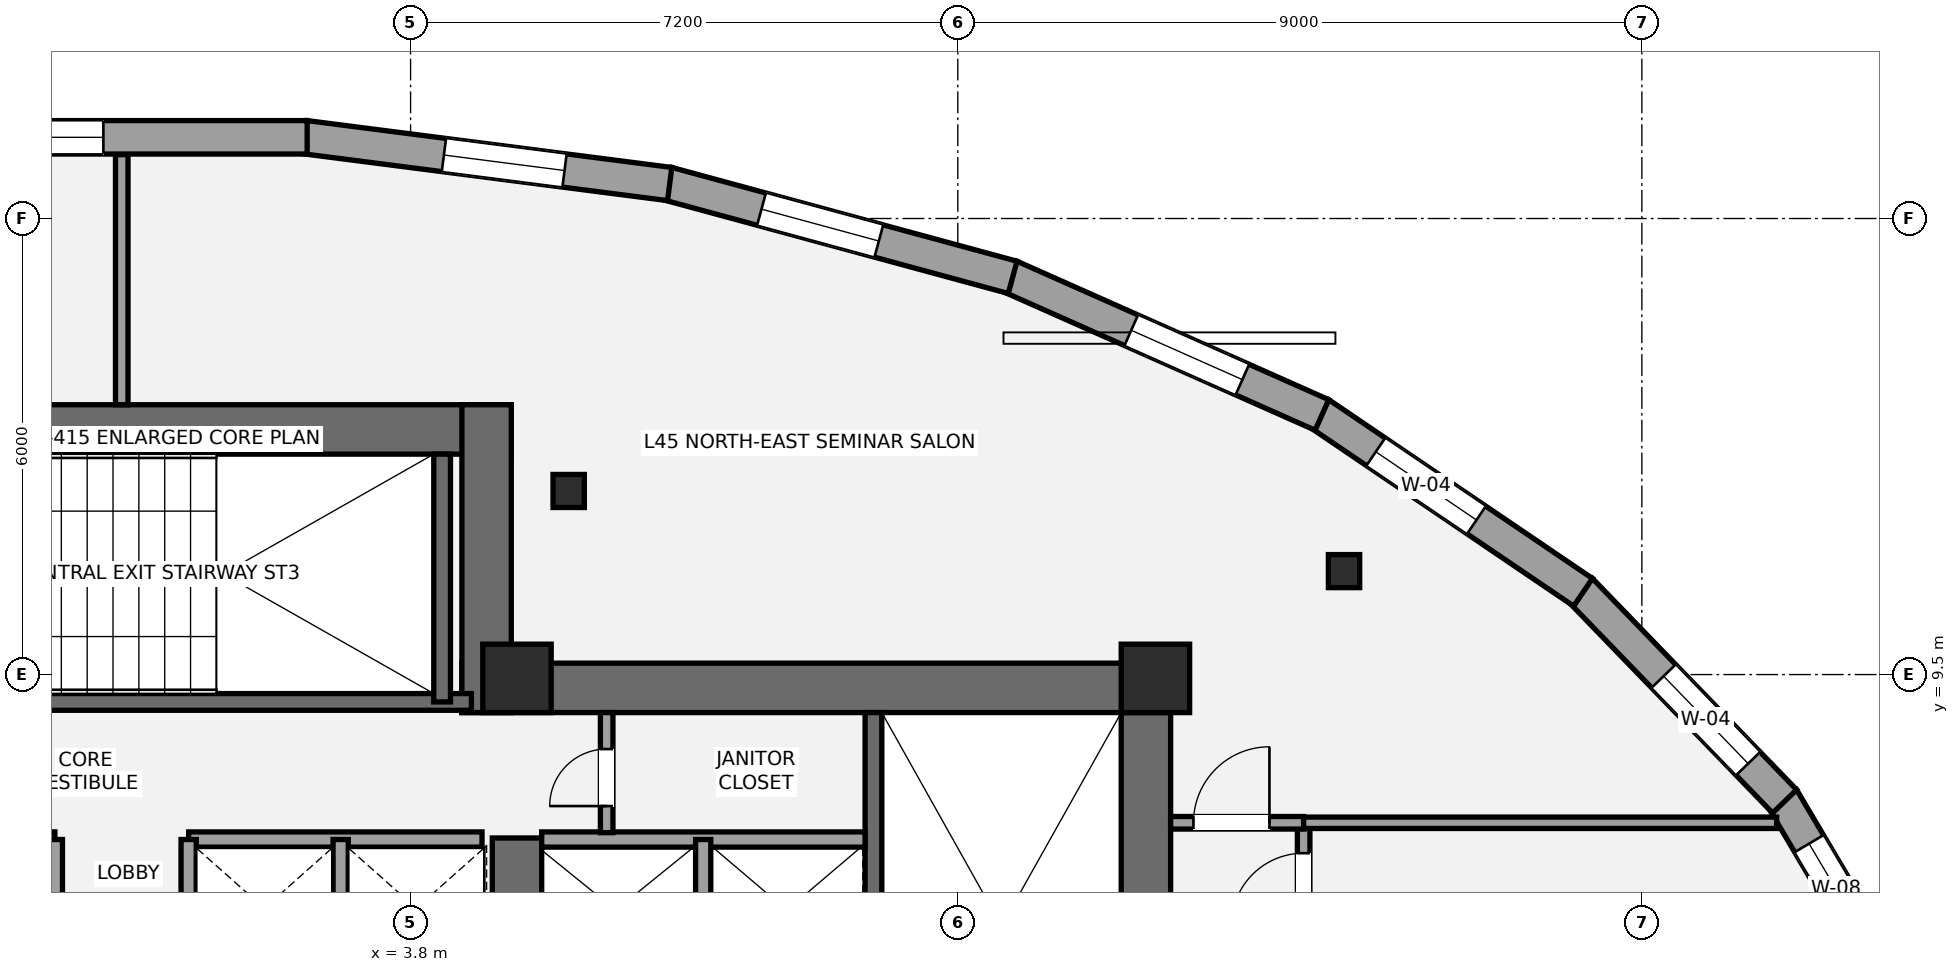
"""IFC4 building model, lengths in metres.
Left out: names, types, materials, properties, quantities, classifications, styles, units other than length and angle.
Written with IfcOpenShell. Run it as: python <this file> out.ifc"""

import sys

from ifc_helpers import new_model, si_unit, direction, frame, frame_2d, origin, origin_2d, place, context, subcontext, project, spatial, rectangle, i_section, extrude, element, fill, save


model = new_model("IFC4")
c1 = context("Model", 3, precision=1e-05, world=origin(), true_north=direction((0.0, 1.0)))
c2 = subcontext(c1, "Body", "Model", "MODEL_VIEW")
j1 = project(units=[si_unit("LENGTHUNIT", "METRE"), si_unit("PLANEANGLEUNIT", "RADIAN")], contexts=[c1])
p1 = place(None, origin())
s1 = spatial("IfcSite", under=j1, at=p1, CompositionType="ELEMENT")
p2 = place(p1, origin())
s2 = spatial("IfcBuilding", under=s1, at=p2, CompositionType="ELEMENT")
p3 = place(p2, frame((0.0, 0.0, 166.2)))
s3 = spatial("IfcBuildingStorey", under=s2, at=p3, CompositionType="ELEMENT", Elevation=166.2)
p4 = place(p3, frame((13.475, 1.2, 0.0), z_axis=(0.0, 0.0, 1.0), x_axis=(0.0, 1.0, 0.0)))
e1 = element("IfcWall", 1, at=p4, inside=s3, PredefinedType="SHEAR", context=c2, shape_type="SweptSolid", body=[
    extrude(rectangle(XDim=8.45, YDim=0.65, at=frame_2d((4.225, 0.0))), origin(), (0.0, 0.0, 1.0), 3.2),
])
p5 = place(p3, frame((4.475, 9.325, 0.0), z_axis=(0.0, 0.0, 1.0), x_axis=(1.0, 0.0, 0.0)))
e2 = element("IfcWall", 2, at=p5, inside=s3, PredefinedType="SHEAR", context=c2, shape_type="SweptSolid", body=[
    extrude(rectangle(XDim=9.325, YDim=0.65, at=frame_2d((4.663, 0.0))), origin(), (0.0, 0.0, 1.0), 3.2),
])
p6 = place(p3, frame((5.2, 5.35, 0.0), z_axis=(0.0, 0.0, 1.0), x_axis=(0.0, 1.0, 0.0)))
e3 = element("IfcWall", 3, at=p6, inside=s3, PredefinedType="SHEAR", context=c2, shape_type="SweptSolid", body=[
    extrude(rectangle(XDim=2.0, YDim=0.65, at=frame_2d((1.0, 0.0))), origin(), (0.0, 0.0, 1.0), 3.2),
])
p7 = place(p3, frame((9.89, 1.85, 0.0), z_axis=(0.0, 0.0, 1.0), x_axis=(0.0, 1.0, 0.0)))
e4 = element("IfcWall", 4, at=p7, inside=s3, PredefinedType="SHEAR", context=c2, shape_type="SweptSolid", body=[
    extrude(rectangle(XDim=7.15, YDim=0.22, at=frame_2d((3.575, 0.0))), origin(), (0.0, 0.0, 1.0), 3.2),
])
p8 = place(p3, frame((-5.125, 12.725, 0.0), z_axis=(0.0, 0.0, 1.0), x_axis=(1.0, 0.0, 0.0)))
e5 = element("IfcWall", 5, at=p8, inside=s3, PredefinedType="SHEAR", context=c2, shape_type="SweptSolid", body=[
    extrude(rectangle(XDim=10.25, YDim=0.65, at=frame_2d((5.125, 0.0))), origin(), (0.0, 0.0, 1.0), 3.2),
])
p9 = place(p3, frame((4.8, 9.0, 0.0), z_axis=(0.0, 0.0, 1.0), x_axis=(0.0, 1.0, 0.0)))
e6 = element("IfcWall", 6, at=p9, inside=s3, PredefinedType="SHEAR", context=c2, shape_type="SweptSolid", body=[
    extrude(rectangle(XDim=4.05, YDim=0.65, at=frame_2d((2.025, 0.0))), origin(), (0.0, 0.0, 1.0), 3.2),
])
p10 = place(p3, frame((-4.7, 9.14, 0.0), z_axis=(0.0, 0.0, 1.0), x_axis=(1.0, 0.0, 0.0)))
e7 = element("IfcWall", 7, at=p10, inside=s3, PredefinedType="SHEAR", context=c2, shape_type="SweptSolid", body=[
    extrude(rectangle(XDim=9.3, YDim=0.22, at=frame_2d((4.65, 0.0))), origin(), (0.0, 0.0, 1.0), 3.2),
])
p11 = place(p10, frame((1.15, 0.0, 0.0)))
e8 = element("IfcOpeningElement", 8, at=p11, cuts=e7, PredefinedType="OPENING", context=c2, shape_type="SweptSolid", body=[
    extrude(rectangle(XDim=1.05, YDim=2.15, at=frame_2d((0.525, 1.075))), frame((0.0, 0.12, 0.0), z_axis=(0.0, -1.0, 0.0), x_axis=(1.0, 0.0, 0.0)), (0.0, 0.0, 1.0), 0.24),
])
p12 = place(p3, frame((4.215, 9.14, 0.0), z_axis=(0.0, 0.0, 1.0), x_axis=(0.0, 1.0, 0.0)))
e9 = element("IfcWall", 9, at=p12, inside=s3, PredefinedType="SHEAR", context=c2, shape_type="SweptSolid", body=[
    extrude(rectangle(XDim=3.26, YDim=0.22, at=frame_2d((1.63, 0.0))), origin(), (0.0, 0.0, 1.0), 3.2),
])
for number, where, z_axis, x_axis in (
    (10, (5.2, 9.45, 0.0), (0.0, 0.0, 1.0), (1.0, 0.0, 0.0)),
    (11, (13.6, 9.45, 0.0), (0.0, 0.0, 1.0), (1.0, 0.0, 0.0)),
):
    element("IfcColumn", number, at=place(p3, frame(where, z_axis=z_axis, x_axis=x_axis)), inside=s3, PredefinedType="COLUMN", context=c2, shape_type="SweptSolid", body=[
        extrude(rectangle(XDim=0.9, YDim=0.9, at=origin_2d()), origin(), (0.0, 0.0, 1.0), 3.2),
    ])
for number, where, z_axis, x_axis in (
    (12, (16.082, 10.861, 0.0), (0.0, 0.0, 1.0), (1.0, 0.0, 0.0)),
    (13, (5.88, 11.915, 0.0), (0.0, 0.0, 1.0), (1.0, 0.0, 0.0)),
):
    element("IfcColumn", number, at=place(p3, frame(where, z_axis=z_axis, x_axis=x_axis)), inside=s3, PredefinedType="COLUMN", context=c2, shape_type="SweptSolid", body=[
        extrude(i_section(OverallWidth=0.412, OverallDepth=0.435, WebThickness=0.036, FlangeThickness=0.057, at=origin_2d()), origin(), (0.0, 0.0, 1.0), 3.2),
    ])
p13 = place(p3, frame((21.847, 7.873, 0.0), z_axis=(0.0, 0.0, 1.0), x_axis=(0.508883387051, -0.860835465338, 0.0)))
e14 = element("IfcWall", 14, at=p13, inside=s3, PredefinedType="STANDARD", context=c2, shape_type="SweptSolid", body=[
    extrude(rectangle(XDim=3.577, YDim=0.44, at=frame_2d((1.788, 0.0))), origin(), (0.0, 0.0, 1.0), 2.315),
])
p14 = place(p13, frame((0.694, 0.0, 0.58)))
e15 = element("IfcOpeningElement", 15, at=p14, cuts=e14, PredefinedType="OPENING", context=c2, shape_type="SweptSolid", body=[
    extrude(rectangle(XDim=1.4, YDim=1.55, at=frame_2d((0.7, 0.775))), frame((0.0, 0.23, 0.0), z_axis=(0.0, -1.0, 0.0), x_axis=(1.0, 0.0, 0.0)), (0.0, 0.0, 1.0), 0.46),
])
p15 = place(p3, frame((19.192, 10.612, 0.0), z_axis=(0.0, 0.0, 1.0), x_axis=(0.694975307772, -0.719033602544, 0.0)))
e16 = element("IfcWall", 16, at=p15, inside=s3, PredefinedType="STANDARD", context=c2, shape_type="SweptSolid", body=[
    extrude(rectangle(XDim=3.866, YDim=0.44, at=frame_2d((1.933, 0.0))), origin(), (0.0, 0.0, 1.0), 2.315),
])
p16 = place(p15, frame((1.575, 0.0, 0.58)))
e17 = element("IfcOpeningElement", 17, at=p16, cuts=e16, PredefinedType="OPENING", context=c2, shape_type="SweptSolid", body=[
    extrude(rectangle(XDim=1.6, YDim=1.55, at=frame_2d((0.8, 0.775))), frame((0.0, 0.23, 0.0), z_axis=(0.0, -1.0, 0.0), x_axis=(1.0, 0.0, 0.0)), (0.0, 0.0, 1.0), 0.46),
])
p17 = place(p3, frame((15.757, 12.935, 0.0), z_axis=(0.0, 0.0, 1.0), x_axis=(0.827760762475, -0.561081206338, 0.0)))
e18 = element("IfcWall", 18, at=p17, inside=s3, PredefinedType="STANDARD", context=c2, shape_type="SweptSolid", body=[
    extrude(rectangle(XDim=4.192, YDim=0.44, at=frame_2d((2.096, 0.0))), origin(), (0.0, 0.0, 1.0), 2.315),
])
p18 = place(p17, frame((0.897, 0.0, 0.58)))
e19 = element("IfcOpeningElement", 19, at=p18, cuts=e18, PredefinedType="OPENING", context=c2, shape_type="SweptSolid", body=[
    extrude(rectangle(XDim=1.6, YDim=1.55, at=frame_2d((0.8, 0.775))), frame((0.0, 0.23, 0.0), z_axis=(0.0, -1.0, 0.0), x_axis=(1.0, 0.0, 0.0)), (0.0, 0.0, 1.0), 0.46),
])
p19 = place(p3, frame((11.69, 14.737, 0.0), z_axis=(0.0, 0.0, 1.0), x_axis=(0.913907994914, -0.405921392431, 0.0)))
e20 = element("IfcWall", 20, at=p19, inside=s3, PredefinedType="STANDARD", context=c2, shape_type="SweptSolid", body=[
    extrude(rectangle(XDim=4.487, YDim=0.44, at=frame_2d((2.244, 0.0))), origin(), (0.0, 0.0, 1.0), 2.315),
])
p20 = place(p19, frame((1.742, 0.0, 0.58)))
e21 = element("IfcOpeningElement", 21, at=p20, cuts=e20, PredefinedType="OPENING", context=c2, shape_type="SweptSolid", body=[
    extrude(rectangle(XDim=1.6, YDim=1.55, at=frame_2d((0.8, 0.775))), frame((0.0, 0.23, 0.0), z_axis=(0.0, -1.0, 0.0), x_axis=(1.0, 0.0, 0.0)), (0.0, 0.0, 1.0), 0.46),
])
p21 = place(p3, frame((7.179, 15.959, 0.0), z_axis=(0.0, 0.0, 1.0), x_axis=(0.965037424263, -0.262112132058, 0.0)))
e22 = element("IfcWall", 22, at=p21, inside=s3, PredefinedType="STANDARD", context=c2, shape_type="SweptSolid", body=[
    extrude(rectangle(XDim=4.707, YDim=0.44, at=frame_2d((2.353, 0.0))), origin(), (0.0, 0.0, 1.0), 2.315),
])
p22 = place(p21, frame((1.283, 0.0, 0.58)))
e23 = element("IfcOpeningElement", 23, at=p22, cuts=e22, PredefinedType="OPENING", context=c2, shape_type="SweptSolid", body=[
    extrude(rectangle(XDim=1.6, YDim=1.55, at=frame_2d((0.8, 0.775))), frame((0.0, 0.23, 0.0), z_axis=(0.0, -1.0, 0.0), x_axis=(1.0, 0.0, 0.0)), (0.0, 0.0, 1.0), 0.46),
])
p23 = place(p3, frame((2.411, 16.57, 0.0), z_axis=(0.0, 0.0, 1.0), x_axis=(0.991852910824, -0.127388395426, 0.0)))
e24 = element("IfcWall", 24, at=p23, inside=s3, PredefinedType="STANDARD", context=c2, shape_type="SweptSolid", body=[
    extrude(rectangle(XDim=4.837, YDim=0.44, at=frame_2d((2.418, 0.0))), origin(), (0.0, 0.0, 1.0), 2.315),
])
p24 = place(p23, frame((1.843, 0.0, 0.58)))
e25 = element("IfcOpeningElement", 25, at=p24, cuts=e24, PredefinedType="OPENING", context=c2, shape_type="SweptSolid", body=[
    extrude(rectangle(XDim=1.6, YDim=1.55, at=frame_2d((0.8, 0.775))), frame((0.0, 0.23, 0.0), z_axis=(0.0, -1.0, 0.0), x_axis=(1.0, 0.0, 0.0)), (0.0, 0.0, 1.0), 0.46),
])
p25 = place(p3, frame((-2.439, 16.568, 0.0), z_axis=(0.0, 0.0, 1.0), x_axis=(1.0, 0.0, 0.0)))
e26 = element("IfcWall", 26, at=p25, inside=s3, PredefinedType="STANDARD", context=c2, shape_type="SweptSolid", body=[
    extrude(rectangle(XDim=4.878, YDim=0.44, at=frame_2d((2.439, 0.0))), origin(), (0.0, 0.0, 1.0), 2.315),
])
p26 = place(p25, frame((0.597, 0.0, 0.58)))
e27 = element("IfcOpeningElement", 27, at=p26, cuts=e26, PredefinedType="OPENING", context=c2, shape_type="SweptSolid", body=[
    extrude(rectangle(XDim=1.6, YDim=1.55, at=frame_2d((0.8, 0.775))), frame((0.0, 0.23, 0.0), z_axis=(0.0, -1.0, 0.0), x_axis=(1.0, 0.0, 0.0)), (0.0, 0.0, 1.0), 0.46),
])
p27 = place(p3, frame((5.525, 7.33, 0.0), z_axis=(0.0, 0.0, 1.0), x_axis=(1.0, 0.0, 0.0)))
e28 = element("IfcWall", 28, at=p27, inside=s3, PredefinedType="SOLIDWALL", context=c2, shape_type="SweptSolid", body=[
    extrude(rectangle(XDim=4.255, YDim=0.2, at=frame_2d((2.127, 0.0))), origin(), (0.0, 0.0, 1.0), 3.02),
])
p28 = place(p3, frame((7.65, 5.47, 0.0), z_axis=(0.0, 0.0, 1.0), x_axis=(0.0, 1.0, 0.0)))
e29 = element("IfcWall", 29, at=p28, inside=s3, PredefinedType="SOLIDWALL", context=c2, shape_type="SweptSolid", body=[
    extrude(rectangle(XDim=1.86, YDim=0.2, at=frame_2d((0.93, 0.0))), origin(), (0.0, 0.0, 1.0), 3.02),
])
for number, where, z_axis, x_axis in (
    (30, (-4.74, 7.33, 0.0), (0.0, 0.0, 1.0), (1.0, 0.0, 0.0)),
    (31, (0.88, 7.33, 0.0), (0.0, 0.0, 1.0), (1.0, 0.0, 0.0)),
):
    element("IfcWall", number, at=place(p3, frame(where, z_axis=z_axis, x_axis=x_axis)), inside=s3, PredefinedType="SOLIDWALL", context=c2, shape_type="SweptSolid", body=[
        extrude(rectangle(XDim=3.86, YDim=0.2, at=frame_2d((1.93, 0.0))), origin(), (0.0, 0.0, 1.0), 3.02),
    ])
for number, where, z_axis, x_axis in (
    (32, (2.88, 5.52, 0.0), (0.0, 0.0, 1.0), (0.0, 1.0, 0.0)),
    (33, (-0.88, 5.52, 0.0), (0.0, 0.0, 1.0), (0.0, 1.0, 0.0)),
    (34, (0.88, 5.52, 0.0), (0.0, 0.0, 1.0), (0.0, 1.0, 0.0)),
):
    element("IfcWall", number, at=place(p3, frame(where, z_axis=z_axis, x_axis=x_axis)), inside=s3, PredefinedType="SOLIDWALL", context=c2, shape_type="SweptSolid", body=[
        extrude(rectangle(XDim=1.81, YDim=0.2, at=frame_2d((0.905, 0.0))), origin(), (0.0, 0.0, 1.0), 3.02),
    ])
p29 = place(p3, frame((6.38, 7.42, 0.0), z_axis=(0.0, 0.0, 1.0), x_axis=(0.0, 1.0, 0.0)))
e35 = element("IfcWall", 35, at=p29, inside=s3, PredefinedType="PARTITIONING", context=c2, shape_type="SweptSolid", body=[
    extrude(rectangle(XDim=1.58, YDim=0.165, at=frame_2d((0.79, 0.0))), origin(), (0.0, 0.0, 1.0), 3.02),
])
p30 = place(p29, frame((0.35, 0.0, 0.0)))
e36 = element("IfcOpeningElement", 36, at=p30, cuts=e35, PredefinedType="OPENING", context=c2, shape_type="SweptSolid", body=[
    extrude(rectangle(XDim=0.75, YDim=2.1, at=frame_2d((0.375, 1.05))), frame((0.0, 0.093, 0.0), z_axis=(0.0, -1.0, 0.0), x_axis=(1.0, 0.0, 0.0)), (0.0, 0.0, 1.0), 0.185),
])
p31 = place(p3, frame((15.55, -12.773, 0.0), z_axis=(0.0, 0.0, 1.0), x_axis=(0.0, 1.0, 0.0)))
e37 = element("IfcWall", 37, at=p31, inside=s3, PredefinedType="PARTITIONING", context=c2, shape_type="SweptSolid", body=[
    extrude(rectangle(XDim=20.323, YDim=0.165, at=frame_2d((10.162, 0.0))), origin(), (0.0, 0.0, 1.0), 2.473),
])
p32 = place(p31, frame((5.773, 0.0, 0.0)))
e38 = element("IfcOpeningElement", 38, at=p32, cuts=e37, PredefinedType="OPENING", context=c2, shape_type="SweptSolid", body=[
    extrude(rectangle(XDim=0.85, YDim=2.1, at=frame_2d((0.425, 1.05))), frame((0.0, 0.093, 0.0), z_axis=(0.0, -1.0, 0.0), x_axis=(1.0, 0.0, 0.0)), (0.0, 0.0, 1.0), 0.185),
])
p33 = place(p31, frame((9.823, 0.0, 0.0)))
e39 = element("IfcOpeningElement", 39, at=p33, cuts=e37, PredefinedType="OPENING", context=c2, shape_type="SweptSolid", body=[
    extrude(rectangle(XDim=0.95, YDim=2.15, at=frame_2d((0.475, 1.075))), frame((0.0, 0.093, 0.0), z_axis=(0.0, -1.0, 0.0), x_axis=(1.0, 0.0, 0.0)), (0.0, 0.0, 1.0), 0.185),
])
p34 = place(p31, frame((14.223, 0.0, 0.0)))
e40 = element("IfcOpeningElement", 40, at=p34, cuts=e37, PredefinedType="OPENING", context=c2, shape_type="SweptSolid", body=[
    extrude(rectangle(XDim=0.95, YDim=2.15, at=frame_2d((0.475, 1.075))), frame((0.0, 0.093, 0.0), z_axis=(0.0, -1.0, 0.0), x_axis=(1.0, 0.0, 0.0)), (0.0, 0.0, 1.0), 0.185),
])
p35 = place(p31, frame((18.973, 0.0, 0.0)))
e41 = element("IfcOpeningElement", 41, at=p35, cuts=e37, PredefinedType="OPENING", context=c2, shape_type="SweptSolid", body=[
    extrude(rectangle(XDim=0.95, YDim=2.15, at=frame_2d((0.475, 1.075))), frame((0.0, 0.093, 0.0), z_axis=(0.0, -1.0, 0.0), x_axis=(1.0, 0.0, 0.0)), (0.0, 0.0, 1.0), 0.185),
])
p36 = place(p3, frame((13.8, 7.55, 0.0), z_axis=(0.0, 0.0, 1.0), x_axis=(1.0, 0.0, 0.0)))
e42 = element("IfcWall", 42, at=p36, inside=s3, PredefinedType="PARTITIONING", context=c2, shape_type="SweptSolid", body=[
    extrude(rectangle(XDim=1.75, YDim=0.165, at=frame_2d((0.875, 0.0))), origin(), (0.0, 0.0, 1.0), 2.473),
])
p37 = place(p36, frame((0.3, 0.0, 0.0)))
e43 = element("IfcOpeningElement", 43, at=p37, cuts=e42, PredefinedType="OPENING", context=c2, shape_type="SweptSolid", body=[
    extrude(rectangle(XDim=1.0, YDim=2.15, at=frame_2d((0.5, 1.075))), frame((0.0, 0.093, 0.0), z_axis=(0.0, -1.0, 0.0), x_axis=(1.0, 0.0, 0.0)), (0.0, 0.0, 1.0), 0.185),
])
p38 = place(p3, frame((15.55, 7.55, 0.0), z_axis=(0.0, 0.0, 1.0), x_axis=(1.0, 0.0, 0.0)))
e44 = element("IfcWall", 44, at=p38, inside=s3, PredefinedType="PLUMBINGWALL", context=c2, shape_type="SweptSolid", body=[
    extrude(rectangle(XDim=6.223, YDim=0.15, at=frame_2d((3.112, 0.0))), origin(), (0.0, 0.0, 1.0), 2.473),
])
p39 = place(p3, frame((0.0, 13.05, 0.0), z_axis=(0.0, 0.0, 1.0), x_axis=(0.0, 1.0, 0.0)))
e45 = element("IfcWall", 45, at=p39, inside=s3, PredefinedType="PARTITIONING", context=c2, shape_type="SweptSolid", body=[
    extrude(rectangle(XDim=3.29, YDim=0.165, at=frame_2d((1.645, 0.0))), origin(), (0.0, 0.0, 1.0), 3.02),
])
p40 = place(p14, origin())
e46 = element("IfcWindow", 46, at=p40, inside=s3, PartitioningType="SINGLE_PANEL", PredefinedType="WINDOW", context=c2, shape_type="SweptSolid", body=[
    extrude(rectangle(XDim=1.4, YDim=1.55, at=frame_2d((0.7, 0.775))), frame((0.0, -0.01, 0.0), z_axis=(0.0, -1.0, 0.0), x_axis=(1.0, 0.0, 0.0)), (0.0, 0.0, 1.0), 0.06),
])
fill(e15, e46)
p41 = place(p16, origin())
e47 = element("IfcWindow", 47, at=p41, inside=s3, PartitioningType="SINGLE_PANEL", PredefinedType="WINDOW", context=c2, shape_type="SweptSolid", body=[
    extrude(rectangle(XDim=1.6, YDim=1.55, at=frame_2d((0.8, 0.775))), frame((0.0, -0.01, 0.0), z_axis=(0.0, -1.0, 0.0), x_axis=(1.0, 0.0, 0.0)), (0.0, 0.0, 1.0), 0.06),
])
fill(e17, e47)
p42 = place(p18, origin())
e48 = element("IfcWindow", 48, at=p42, inside=s3, PartitioningType="SINGLE_PANEL", PredefinedType="WINDOW", context=c2, shape_type="SweptSolid", body=[
    extrude(rectangle(XDim=1.6, YDim=1.55, at=frame_2d((0.8, 0.775))), frame((0.0, -0.01, 0.0), z_axis=(0.0, -1.0, 0.0), x_axis=(1.0, 0.0, 0.0)), (0.0, 0.0, 1.0), 0.06),
])
fill(e19, e48)
p43 = place(p20, origin())
e49 = element("IfcWindow", 49, at=p43, inside=s3, PartitioningType="SINGLE_PANEL", PredefinedType="WINDOW", context=c2, shape_type="SweptSolid", body=[
    extrude(rectangle(XDim=1.6, YDim=1.55, at=frame_2d((0.8, 0.775))), frame((0.0, -0.01, 0.0), z_axis=(0.0, -1.0, 0.0), x_axis=(1.0, 0.0, 0.0)), (0.0, 0.0, 1.0), 0.06),
])
fill(e21, e49)
p44 = place(p22, origin())
e50 = element("IfcWindow", 50, at=p44, inside=s3, PartitioningType="SINGLE_PANEL", PredefinedType="WINDOW", context=c2, shape_type="SweptSolid", body=[
    extrude(rectangle(XDim=1.6, YDim=1.55, at=frame_2d((0.8, 0.775))), frame((0.0, -0.01, 0.0), z_axis=(0.0, -1.0, 0.0), x_axis=(1.0, 0.0, 0.0)), (0.0, 0.0, 1.0), 0.06),
])
fill(e23, e50)
p45 = place(p24, origin())
e51 = element("IfcWindow", 51, at=p45, inside=s3, PartitioningType="SINGLE_PANEL", PredefinedType="WINDOW", context=c2, shape_type="SweptSolid", body=[
    extrude(rectangle(XDim=1.6, YDim=1.55, at=frame_2d((0.8, 0.775))), frame((0.0, -0.01, 0.0), z_axis=(0.0, -1.0, 0.0), x_axis=(1.0, 0.0, 0.0)), (0.0, 0.0, 1.0), 0.06),
])
fill(e25, e51)
p46 = place(p26, origin())
e52 = element("IfcWindow", 52, at=p46, inside=s3, PartitioningType="SINGLE_PANEL", PredefinedType="WINDOW", context=c2, shape_type="SweptSolid", body=[
    extrude(rectangle(XDim=1.6, YDim=1.55, at=frame_2d((0.8, 0.775))), frame((0.0, -0.01, 0.0), z_axis=(0.0, -1.0, 0.0), x_axis=(1.0, 0.0, 0.0)), (0.0, 0.0, 1.0), 0.06),
])
fill(e27, e52)
p47 = place(p30, origin())
e53 = element("IfcDoor", 53, at=p47, inside=s3, OperationType="SINGLE_SWING_LEFT", PredefinedType="DOOR", context=c2, shape_type="SweptSolid", body=[
    extrude(rectangle(XDim=0.75, YDim=2.1, at=frame_2d((0.375, 1.05))), frame((0.0, 0.025, 0.0), z_axis=(0.0, -1.0, 0.0), x_axis=(1.0, 0.0, 0.0)), (0.0, 0.0, 1.0), 0.05),
])
fill(e36, e53)
p48 = place(p37, origin())
e54 = element("IfcDoor", 54, at=p48, inside=s3, OperationType="SINGLE_SWING_RIGHT", PredefinedType="DOOR", context=c2, shape_type="SweptSolid", body=[
    extrude(rectangle(XDim=1.0, YDim=2.15, at=frame_2d((0.5, 1.075))), frame((0.0, 0.025, 0.0), z_axis=(0.0, -1.0, 0.0), x_axis=(1.0, 0.0, 0.0)), (0.0, 0.0, 1.0), 0.05),
])
fill(e43, e54)
p49 = place(p35, origin())
e55 = element("IfcDoor", 55, at=p49, inside=s3, OperationType="SINGLE_SWING_LEFT", PredefinedType="DOOR", context=c2, shape_type="SweptSolid", body=[
    extrude(rectangle(XDim=0.95, YDim=2.15, at=frame_2d((0.475, 1.075))), frame((0.0, 0.025, 0.0), z_axis=(0.0, -1.0, 0.0), x_axis=(1.0, 0.0, 0.0)), (0.0, 0.0, 1.0), 0.05),
])
fill(e41, e55)
save(model, sys.argv[1])
